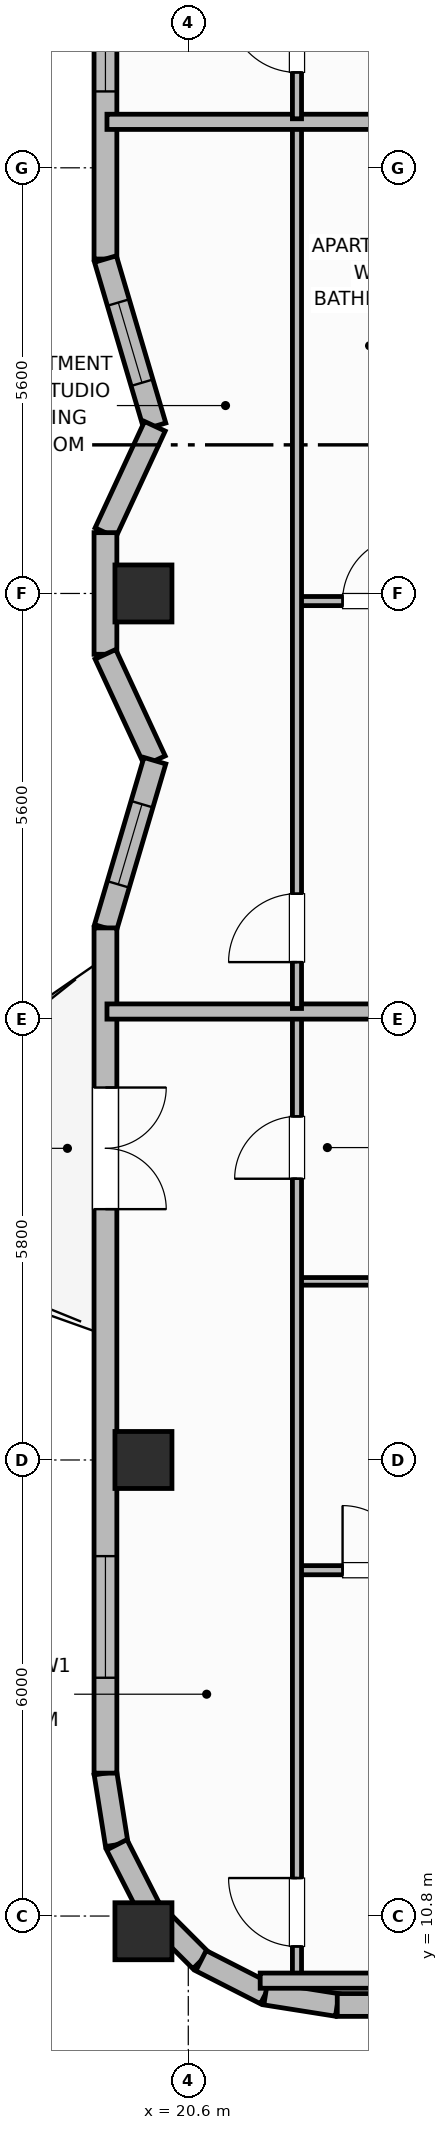
"""IFC4 building model, lengths in metres.
Left out: names, types, materials, properties, quantities, classifications, styles, units other than length and angle.
Written with IfcOpenShell. Run it as: python <this file> out.ifc"""

import sys

from ifc_helpers import new_model, si_unit, direction, frame, frame_2d, origin, origin_2d, place, context, subcontext, project, spatial, rectangle, extrude, element, fill, save


model = new_model("IFC4")
c1 = context("Model", 3, precision=1e-05, world=origin(), true_north=direction((0.0, 1.0)))
c2 = subcontext(c1, "Body", "Model", "MODEL_VIEW")
j1 = project(units=[si_unit("LENGTHUNIT", "METRE"), si_unit("PLANEANGLEUNIT", "RADIAN")], contexts=[c1])
p1 = place(None, origin())
s1 = spatial("IfcSite", under=j1, at=p1, CompositionType="ELEMENT")
p2 = place(p1, origin())
s2 = spatial("IfcBuilding", under=s1, at=p2, CompositionType="ELEMENT")
p3 = place(p2, frame((0.0, 0.0, 282.4)))
s3 = spatial("IfcBuildingStorey", under=s2, at=p3, CompositionType="ELEMENT", Elevation=282.4)
for number, where, z_axis, x_axis in (
    (1, (20.01, 10.6, 0.0), (0.0, 0.0, 1.0), (1.0, 0.0, 0.0)),
    (2, (20.01, 16.8, 0.0), (0.0, 0.0, 1.0), (1.0, 0.0, 0.0)),
    (3, (20.01, 28.2, 0.0), (0.0, 0.0, 1.0), (1.0, 0.0, 0.0)),
):
    element("IfcColumn", number, at=place(p3, frame(where, z_axis=z_axis, x_axis=x_axis)), inside=s3, PredefinedType="COLUMN", context=c2, shape_type="SweptSolid", body=[
        extrude(rectangle(XDim=0.75, YDim=0.75, at=origin_2d()), origin(), (0.0, 0.0, 1.0), 3.7),
    ])
p4 = place(p3, frame((19.51, 12.68, 0.0), z_axis=(0.0, 0.0, 1.0), x_axis=(0.156343617883, -0.987702725088, 0.0)))
e4 = element("IfcWall", 4, at=p4, inside=s3, PredefinedType="SOLIDWALL", context=c2, shape_type="SweptSolid", body=[
    extrude(rectangle(XDim=0.954, YDim=0.3, at=frame_2d((0.477, 0.0))), origin(), (0.0, 0.0, 1.0), 2.73),
])
for number, where, z_axis, x_axis in (
    (5, (19.659, 11.738, 0.0), (0.0, 0.0, 1.0), (0.454, -0.891, 0.0)),
    (6, (20.093, 10.887, 0.0), (0.0, 0.0, 1.0), (0.707, -0.707, 0.0)),
):
    element("IfcWall", number, at=place(p3, frame(where, z_axis=z_axis, x_axis=x_axis)), inside=s3, PredefinedType="SOLIDWALL", context=c2, shape_type="SweptSolid", body=[
        extrude(rectangle(XDim=0.954, YDim=0.3, at=frame_2d((0.477, 0.0))), origin(), (0.0, 0.0, 1.0), 2.73),
    ])
p5 = place(p3, frame((20.767, 10.212, 0.0), z_axis=(0.0, 0.0, 1.0), x_axis=(0.891023873617, -0.45395644796, 0.0)))
e7 = element("IfcWall", 7, at=p5, inside=s3, PredefinedType="SOLIDWALL", context=c2, shape_type="SweptSolid", body=[
    extrude(rectangle(XDim=0.954, YDim=0.3, at=frame_2d((0.477, 0.0))), origin(), (0.0, 0.0, 1.0), 2.73),
])
p6 = place(p3, frame((21.617, 9.779, 0.0), z_axis=(0.0, 0.0, 1.0), x_axis=(0.987669453596, -0.156553666304, 0.0)))
e8 = element("IfcWall", 8, at=p6, inside=s3, PredefinedType="SOLIDWALL", context=c2, shape_type="SweptSolid", body=[
    extrude(rectangle(XDim=0.954, YDim=0.3, at=frame_2d((0.477, 0.0))), origin(), (0.0, 0.0, 1.0), 2.73),
])
p7 = place(p3, frame((22.56, 9.63, 0.0), z_axis=(0.0, 0.0, 1.0), x_axis=(1.0, 0.0, 0.0)))
e9 = element("IfcWall", 9, at=p7, inside=s3, PredefinedType="SOLIDWALL", context=c2, shape_type="SweptSolid", body=[
    extrude(rectangle(XDim=33.28, YDim=0.3, at=frame_2d((16.64, 0.0))), origin(), (0.0, 0.0, 1.0), 2.73),
])
p8 = place(p7, frame((5.18, 0.0, 0.71)))
e10 = element("IfcOpeningElement", 10, at=p8, cuts=e9, PredefinedType="OPENING", context=c2, shape_type="SweptSolid", body=[
    extrude(rectangle(XDim=1.6, YDim=1.9, at=frame_2d((0.8, 0.95))), frame((0.0, 0.16, 0.0), z_axis=(0.0, -1.0, 0.0), x_axis=(1.0, 0.0, 0.0)), (0.0, 0.0, 1.0), 0.32),
])
p9 = place(p7, frame((8.733, 0.0, 0.71)))
e11 = element("IfcOpeningElement", 11, at=p9, cuts=e9, PredefinedType="OPENING", context=c2, shape_type="SweptSolid", body=[
    extrude(rectangle(XDim=1.6, YDim=1.9, at=frame_2d((0.8, 0.95))), frame((0.0, 0.16, 0.0), z_axis=(0.0, -1.0, 0.0), x_axis=(1.0, 0.0, 0.0)), (0.0, 0.0, 1.0), 0.32),
])
p10 = place(p7, frame((15.84, 0.0, 0.71)))
e12 = element("IfcOpeningElement", 12, at=p10, cuts=e9, PredefinedType="OPENING", context=c2, shape_type="SweptSolid", body=[
    extrude(rectangle(XDim=1.6, YDim=1.9, at=frame_2d((0.8, 0.95))), frame((0.0, 0.16, 0.0), z_axis=(0.0, -1.0, 0.0), x_axis=(1.0, 0.0, 0.0)), (0.0, 0.0, 1.0), 0.32),
])
p11 = place(p7, frame((22.947, 0.0, 0.71)))
e13 = element("IfcOpeningElement", 13, at=p11, cuts=e9, PredefinedType="OPENING", context=c2, shape_type="SweptSolid", body=[
    extrude(rectangle(XDim=1.6, YDim=1.9, at=frame_2d((0.8, 0.95))), frame((0.0, 0.16, 0.0), z_axis=(0.0, -1.0, 0.0), x_axis=(1.0, 0.0, 0.0)), (0.0, 0.0, 1.0), 0.32),
])
p12 = place(p7, frame((26.5, 0.0, 0.71)))
e14 = element("IfcOpeningElement", 14, at=p12, cuts=e9, PredefinedType="OPENING", context=c2, shape_type="SweptSolid", body=[
    extrude(rectangle(XDim=1.6, YDim=1.9, at=frame_2d((0.8, 0.95))), frame((0.0, 0.16, 0.0), z_axis=(0.0, -1.0, 0.0), x_axis=(1.0, 0.0, 0.0)), (0.0, 0.0, 1.0), 0.32),
])
p13 = place(p3, frame((19.51, 43.72, 0.0), z_axis=(0.0, 0.0, 1.0), x_axis=(0.0, -1.0, 0.0)))
e15 = element("IfcWall", 15, at=p13, inside=s3, PredefinedType="SOLIDWALL", context=c2, shape_type="SweptSolid", body=[
    extrude(rectangle(XDim=11.12, YDim=0.3, at=frame_2d((5.56, 0.0))), origin(), (0.0, 0.0, 1.0), 2.73),
])
p14 = place(p13, frame((7.115, 0.0, 0.76)))
e16 = element("IfcOpeningElement", 16, at=p14, cuts=e15, PredefinedType="OPENING", context=c2, shape_type="SweptSolid", body=[
    extrude(rectangle(XDim=1.8, YDim=1.85, at=frame_2d((0.9, 0.925))), frame((0.0, 0.16, 0.0), z_axis=(0.0, -1.0, 0.0), x_axis=(1.0, 0.0, 0.0)), (0.0, 0.0, 1.0), 0.32),
])
p15 = place(p3, frame((19.51, 32.6, 0.0), z_axis=(0.0, 0.0, 1.0), x_axis=(0.28328385701, -0.959036107953, 0.0)))
e17 = element("IfcWall", 17, at=p15, inside=s3, PredefinedType="SOLIDWALL", context=c2, shape_type="SweptSolid", body=[
    extrude(rectangle(XDim=2.294, YDim=0.3, at=frame_2d((1.147, 0.0))), origin(), (0.0, 0.0, 1.0), 2.73),
])
p16 = place(p15, frame((0.597, 0.0, 0.92)))
e18 = element("IfcOpeningElement", 18, at=p16, cuts=e17, PredefinedType="OPENING", context=c2, shape_type="SweptSolid", body=[
    extrude(rectangle(XDim=1.1, YDim=1.65, at=frame_2d((0.55, 0.825))), frame((0.0, 0.16, 0.0), z_axis=(0.0, -1.0, 0.0), x_axis=(1.0, 0.0, 0.0)), (0.0, 0.0, 1.0), 0.32),
])
p17 = place(p3, frame((20.16, 30.4, 0.0), z_axis=(0.0, 0.0, 1.0), x_axis=(-0.421083420882, -0.907021914101, 0.0)))
e19 = element("IfcWall", 19, at=p17, inside=s3, PredefinedType="SOLIDWALL", context=c2, shape_type="SweptSolid", body=[
    extrude(rectangle(XDim=1.543, YDim=0.3, at=frame_2d((0.772, 0.0))), origin(), (0.0, 0.0, 1.0), 2.73),
])
p18 = place(p3, frame((19.51, 29.0, 0.0), z_axis=(0.0, 0.0, 1.0), x_axis=(0.0, -1.0, 0.0)))
e20 = element("IfcWall", 20, at=p18, inside=s3, PredefinedType="SOLIDWALL", context=c2, shape_type="SweptSolid", body=[
    extrude(rectangle(XDim=1.6, YDim=0.3, at=frame_2d((0.8, 0.0))), origin(), (0.0, 0.0, 1.0), 2.73),
])
p19 = place(p3, frame((19.51, 27.4, 0.0), z_axis=(0.0, 0.0, 1.0), x_axis=(0.421083420882, -0.907021914101, 0.0)))
e21 = element("IfcWall", 21, at=p19, inside=s3, PredefinedType="SOLIDWALL", context=c2, shape_type="SweptSolid", body=[
    extrude(rectangle(XDim=1.543, YDim=0.3, at=frame_2d((0.772, 0.0))), origin(), (0.0, 0.0, 1.0), 2.73),
])
p20 = place(p3, frame((20.16, 26.0, 0.0), z_axis=(0.0, 0.0, 1.0), x_axis=(-0.283312771328, -0.959027566654, 0.0)))
e22 = element("IfcWall", 22, at=p20, inside=s3, PredefinedType="SOLIDWALL", context=c2, shape_type="SweptSolid", body=[
    extrude(rectangle(XDim=2.294, YDim=0.3, at=frame_2d((1.147, 0.0))), origin(), (0.0, 0.0, 1.0), 2.73),
])
p21 = place(p20, frame((0.597, 0.0, 0.92)))
e23 = element("IfcOpeningElement", 23, at=p21, cuts=e22, PredefinedType="OPENING", context=c2, shape_type="SweptSolid", body=[
    extrude(rectangle(XDim=1.1, YDim=1.65, at=frame_2d((0.55, 0.825))), frame((0.0, 0.16, 0.0), z_axis=(0.0, -1.0, 0.0), x_axis=(1.0, 0.0, 0.0)), (0.0, 0.0, 1.0), 0.32),
])
p22 = place(p3, frame((19.51, 23.8, 0.0), z_axis=(0.0, 0.0, 1.0), x_axis=(0.0, -1.0, 0.0)))
e24 = element("IfcWall", 24, at=p22, inside=s3, PredefinedType="SOLIDWALL", context=c2, shape_type="SweptSolid", body=[
    extrude(rectangle(XDim=11.12, YDim=0.3, at=frame_2d((5.56, 0.0))), origin(), (0.0, 0.0, 1.0), 2.73),
])
p23 = place(p22, frame((2.1, 0.0, 0.0)))
e25 = element("IfcOpeningElement", 25, at=p23, cuts=e24, PredefinedType="OPENING", context=c2, shape_type="SweptSolid", body=[
    extrude(rectangle(XDim=1.6, YDim=2.1, at=frame_2d((0.8, 1.05))), frame((0.0, 0.16, 0.0), z_axis=(0.0, -1.0, 0.0), x_axis=(1.0, 0.0, 0.0)), (0.0, 0.0, 1.0), 0.32),
])
p24 = place(p22, frame((8.265, 0.0, 0.71)))
e26 = element("IfcOpeningElement", 26, at=p24, cuts=e24, PredefinedType="OPENING", context=c2, shape_type="SweptSolid", body=[
    extrude(rectangle(XDim=1.6, YDim=1.9, at=frame_2d((0.8, 0.95))), frame((0.0, 0.16, 0.0), z_axis=(0.0, -1.0, 0.0), x_axis=(1.0, 0.0, 0.0)), (0.0, 0.0, 1.0), 0.32),
])
p25 = place(p3, frame((22.03, 15.35, 0.0), z_axis=(0.0, 0.0, 1.0), x_axis=(1.0, 0.0, 0.0)))
e27 = element("IfcWall", 27, at=p25, inside=s3, PredefinedType="PARTITIONING", context=c2, shape_type="SweptSolid", body=[
    extrude(rectangle(XDim=1.95, YDim=0.12, at=frame_2d((0.975, 0.0))), origin(), (0.0, 0.0, 1.0), 2.56),
])
p26 = place(p25, frame((0.6, 0.0, 0.0)))
e28 = element("IfcOpeningElement", 28, at=p26, cuts=e27, PredefinedType="OPENING", context=c2, shape_type="SweptSolid", body=[
    extrude(rectangle(XDim=0.85, YDim=2.1, at=frame_2d((0.425, 1.05))), frame((0.0, 0.07, 0.0), z_axis=(0.0, -1.0, 0.0), x_axis=(1.0, 0.0, 0.0)), (0.0, 0.0, 1.0), 0.14),
])
p27 = place(p3, frame((22.03, 19.15, 0.0), z_axis=(0.0, 0.0, 1.0), x_axis=(1.0, 0.0, 0.0)))
e29 = element("IfcWall", 29, at=p27, inside=s3, PredefinedType="PARTITIONING", context=c2, shape_type="SweptSolid", body=[
    extrude(rectangle(XDim=1.95, YDim=0.1, at=frame_2d((0.975, 0.0))), origin(), (0.0, 0.0, 1.0), 2.56),
])
p28 = place(p3, frame((22.03, 9.99, 0.0), z_axis=(0.0, 0.0, 1.0), x_axis=(0.0, 1.0, 0.0)))
e30 = element("IfcWall", 30, at=p28, inside=s3, PredefinedType="PARTITIONING", context=c2, shape_type="SweptSolid", body=[
    extrude(rectangle(XDim=12.67, YDim=0.12, at=frame_2d((6.335, 0.0))), origin(), (0.0, 0.0, 1.0), 2.56),
])
p29 = place(p28, frame((0.41, 0.0, 0.0)))
e31 = element("IfcOpeningElement", 31, at=p29, cuts=e30, PredefinedType="OPENING", context=c2, shape_type="SweptSolid", body=[
    extrude(rectangle(XDim=0.9, YDim=2.1, at=frame_2d((0.45, 1.05))), frame((0.0, 0.07, 0.0), z_axis=(0.0, -1.0, 0.0), x_axis=(1.0, 0.0, 0.0)), (0.0, 0.0, 1.0), 0.14),
])
p30 = place(p28, frame((10.51, 0.0, 0.0)))
e32 = element("IfcOpeningElement", 32, at=p30, cuts=e30, PredefinedType="OPENING", context=c2, shape_type="SweptSolid", body=[
    extrude(rectangle(XDim=0.82, YDim=2.08, at=frame_2d((0.41, 1.04))), frame((0.0, 0.07, 0.0), z_axis=(0.0, -1.0, 0.0), x_axis=(1.0, 0.0, 0.0)), (0.0, 0.0, 1.0), 0.14),
])
p31 = place(p3, frame((19.53, 22.7, 0.0), z_axis=(0.0, 0.0, 1.0), x_axis=(1.0, 0.0, 0.0)))
e33 = element("IfcWall", 33, at=p31, inside=s3, PredefinedType="PARTITIONING", context=c2, shape_type="SweptSolid", body=[
    extrude(rectangle(XDim=4.45, YDim=0.2, at=frame_2d((2.225, 0.0))), origin(), (0.0, 0.0, 1.0), 2.56),
])
p32 = place(p3, frame((22.03, 28.1, 0.0), z_axis=(0.0, 0.0, 1.0), x_axis=(1.0, 0.0, 0.0)))
e34 = element("IfcWall", 34, at=p32, inside=s3, PredefinedType="PARTITIONING", context=c2, shape_type="SweptSolid", body=[
    extrude(rectangle(XDim=1.95, YDim=0.12, at=frame_2d((0.975, 0.0))), origin(), (0.0, 0.0, 1.0), 2.56),
])
p33 = place(p32, frame((0.6, 0.0, 0.0)))
e35 = element("IfcOpeningElement", 35, at=p33, cuts=e34, PredefinedType="OPENING", context=c2, shape_type="SweptSolid", body=[
    extrude(rectangle(XDim=0.85, YDim=2.1, at=frame_2d((0.425, 1.05))), frame((0.0, 0.07, 0.0), z_axis=(0.0, -1.0, 0.0), x_axis=(1.0, 0.0, 0.0)), (0.0, 0.0, 1.0), 0.14),
])
p34 = place(p3, frame((22.03, 22.74, 0.0), z_axis=(0.0, 0.0, 1.0), x_axis=(0.0, 1.0, 0.0)))
e36 = element("IfcWall", 36, at=p34, inside=s3, PredefinedType="PARTITIONING", context=c2, shape_type="SweptSolid", body=[
    extrude(rectangle(XDim=11.625, YDim=0.12, at=frame_2d((5.812, 0.0))), origin(), (0.0, 0.0, 1.0), 2.56),
])
p35 = place(p34, frame((0.61, 0.0, 0.0)))
e37 = element("IfcOpeningElement", 37, at=p35, cuts=e36, PredefinedType="OPENING", context=c2, shape_type="SweptSolid", body=[
    extrude(rectangle(XDim=0.9, YDim=2.1, at=frame_2d((0.45, 1.05))), frame((0.0, 0.07, 0.0), z_axis=(0.0, -1.0, 0.0), x_axis=(1.0, 0.0, 0.0)), (0.0, 0.0, 1.0), 0.14),
])
p36 = place(p3, frame((19.53, 34.405, 0.0), z_axis=(0.0, 0.0, 1.0), x_axis=(1.0, 0.0, 0.0)))
e38 = element("IfcWall", 38, at=p36, inside=s3, PredefinedType="PARTITIONING", context=c2, shape_type="SweptSolid", body=[
    extrude(rectangle(XDim=4.45, YDim=0.2, at=frame_2d((2.225, 0.0))), origin(), (0.0, 0.0, 1.0), 2.56),
])
p37 = place(p3, frame((22.03, 34.445, 0.0), z_axis=(0.0, 0.0, 1.0), x_axis=(0.0, 1.0, 0.0)))
e39 = element("IfcWall", 39, at=p37, inside=s3, PredefinedType="PARTITIONING", context=c2, shape_type="SweptSolid", body=[
    extrude(rectangle(XDim=11.965, YDim=0.12, at=frame_2d((5.982, 0.0))), origin(), (0.0, 0.0, 1.0), 2.56),
])
p38 = place(p37, frame((0.61, 0.0, 0.0)))
e40 = element("IfcOpeningElement", 40, at=p38, cuts=e39, PredefinedType="OPENING", context=c2, shape_type="SweptSolid", body=[
    extrude(rectangle(XDim=0.9, YDim=2.1, at=frame_2d((0.45, 1.05))), frame((0.0, 0.07, 0.0), z_axis=(0.0, -1.0, 0.0), x_axis=(1.0, 0.0, 0.0)), (0.0, 0.0, 1.0), 0.14),
])
p39 = place(p37, frame((10.157, 0.0, 0.0)))
e41 = element("IfcOpeningElement", 41, at=p39, cuts=e39, PredefinedType="OPENING", context=c2, shape_type="SweptSolid", body=[
    extrude(rectangle(XDim=0.82, YDim=2.08, at=frame_2d((0.41, 1.04))), frame((0.0, 0.07, 0.0), z_axis=(0.0, -1.0, 0.0), x_axis=(1.0, 0.0, 0.0)), (0.0, 0.0, 1.0), 0.14),
])
p40 = place(p3, frame((21.546, 9.95, 0.0), z_axis=(0.0, 0.0, 1.0), x_axis=(1.0, 0.0, 0.0)))
e42 = element("IfcWall", 42, at=p40, inside=s3, PredefinedType="PARTITIONING", context=c2, shape_type="SweptSolid", body=[
    extrude(rectangle(XDim=3.754, YDim=0.2, at=frame_2d((1.877, 0.0))), origin(), (0.0, 0.0, 1.0), 2.56),
])
p41 = place(p14, origin())
e43 = element("IfcWindow", 43, at=p41, inside=s3, PartitioningType="SINGLE_PANEL", PredefinedType="WINDOW", context=c2, shape_type="SweptSolid", body=[
    extrude(rectangle(XDim=1.8, YDim=1.85, at=frame_2d((0.9, 0.925))), frame((0.0, 0.03, 0.0), z_axis=(0.0, -1.0, 0.0), x_axis=(1.0, 0.0, 0.0)), (0.0, 0.0, 1.0), 0.06),
])
fill(e16, e43)
p42 = place(p16, origin())
e44 = element("IfcWindow", 44, at=p42, inside=s3, PartitioningType="SINGLE_PANEL", PredefinedType="WINDOW", context=c2, shape_type="SweptSolid", body=[
    extrude(rectangle(XDim=1.1, YDim=1.65, at=frame_2d((0.55, 0.825))), frame((0.0, 0.03, 0.0), z_axis=(0.0, -1.0, 0.0), x_axis=(1.0, 0.0, 0.0)), (0.0, 0.0, 1.0), 0.06),
])
fill(e18, e44)
p43 = place(p21, origin())
e45 = element("IfcWindow", 45, at=p43, inside=s3, PartitioningType="SINGLE_PANEL", PredefinedType="WINDOW", context=c2, shape_type="SweptSolid", body=[
    extrude(rectangle(XDim=1.1, YDim=1.65, at=frame_2d((0.55, 0.825))), frame((0.0, 0.03, 0.0), z_axis=(0.0, -1.0, 0.0), x_axis=(1.0, 0.0, 0.0)), (0.0, 0.0, 1.0), 0.06),
])
fill(e23, e45)
p44 = place(p23, origin())
e46 = element("IfcDoor", 46, at=p44, inside=s3, OperationType="DOUBLE_DOOR_SINGLE_SWING", PredefinedType="DOOR", context=c2, shape_type="SweptSolid", body=[
    extrude(rectangle(XDim=1.6, YDim=2.1, at=frame_2d((0.8, 1.05))), frame((0.0, 0.025, 0.0), z_axis=(0.0, -1.0, 0.0), x_axis=(1.0, 0.0, 0.0)), (0.0, 0.0, 1.0), 0.05),
])
fill(e25, e46)
p45 = place(p24, origin())
e47 = element("IfcWindow", 47, at=p45, inside=s3, PartitioningType="SINGLE_PANEL", PredefinedType="WINDOW", context=c2, shape_type="SweptSolid", body=[
    extrude(rectangle(XDim=1.6, YDim=1.9, at=frame_2d((0.8, 0.95))), frame((0.0, 0.03, 0.0), z_axis=(0.0, -1.0, 0.0), x_axis=(1.0, 0.0, 0.0)), (0.0, 0.0, 1.0), 0.06),
])
fill(e26, e47)
p46 = place(p26, origin())
e48 = element("IfcDoor", 48, at=p46, inside=s3, OperationType="SINGLE_SWING_LEFT", PredefinedType="DOOR", context=c2, shape_type="SweptSolid", body=[
    extrude(rectangle(XDim=0.85, YDim=2.1, at=frame_2d((0.425, 1.05))), frame((0.0, 0.025, 0.0), z_axis=(0.0, -1.0, 0.0), x_axis=(1.0, 0.0, 0.0)), (0.0, 0.0, 1.0), 0.05),
])
fill(e28, e48)
p47 = place(p29, origin())
e49 = element("IfcDoor", 49, at=p47, inside=s3, OperationType="SINGLE_SWING_RIGHT", PredefinedType="DOOR", context=c2, shape_type="SweptSolid", body=[
    extrude(rectangle(XDim=0.9, YDim=2.1, at=frame_2d((0.45, 1.05))), frame((0.0, 0.025, 0.0), z_axis=(0.0, -1.0, 0.0), x_axis=(1.0, 0.0, 0.0)), (0.0, 0.0, 1.0), 0.05),
])
fill(e31, e49)
p48 = place(p30, origin())
e50 = element("IfcDoor", 50, at=p48, inside=s3, OperationType="SINGLE_SWING_LEFT", PredefinedType="DOOR", context=c2, shape_type="SweptSolid", body=[
    extrude(rectangle(XDim=0.82, YDim=2.08, at=frame_2d((0.41, 1.04))), frame((0.0, 0.025, 0.0), z_axis=(0.0, -1.0, 0.0), x_axis=(1.0, 0.0, 0.0)), (0.0, 0.0, 1.0), 0.05),
])
fill(e32, e50)
p49 = place(p33, origin())
e51 = element("IfcDoor", 51, at=p49, inside=s3, OperationType="SINGLE_SWING_RIGHT", PredefinedType="DOOR", context=c2, shape_type="SweptSolid", body=[
    extrude(rectangle(XDim=0.85, YDim=2.1, at=frame_2d((0.425, 1.05))), frame((0.0, 0.025, 0.0), z_axis=(0.0, -1.0, 0.0), x_axis=(1.0, 0.0, 0.0)), (0.0, 0.0, 1.0), 0.05),
])
fill(e35, e51)
p50 = place(p35, origin())
e52 = element("IfcDoor", 52, at=p50, inside=s3, OperationType="SINGLE_SWING_LEFT", PredefinedType="DOOR", context=c2, shape_type="SweptSolid", body=[
    extrude(rectangle(XDim=0.9, YDim=2.1, at=frame_2d((0.45, 1.05))), frame((0.0, 0.025, 0.0), z_axis=(0.0, -1.0, 0.0), x_axis=(1.0, 0.0, 0.0)), (0.0, 0.0, 1.0), 0.05),
])
fill(e37, e52)
p51 = place(p38, origin())
e53 = element("IfcDoor", 53, at=p51, inside=s3, OperationType="SINGLE_SWING_RIGHT", PredefinedType="DOOR", context=c2, shape_type="SweptSolid", body=[
    extrude(rectangle(XDim=0.9, YDim=2.1, at=frame_2d((0.45, 1.05))), frame((0.0, 0.025, 0.0), z_axis=(0.0, -1.0, 0.0), x_axis=(1.0, 0.0, 0.0)), (0.0, 0.0, 1.0), 0.05),
])
fill(e40, e53)
save(model, sys.argv[1])
